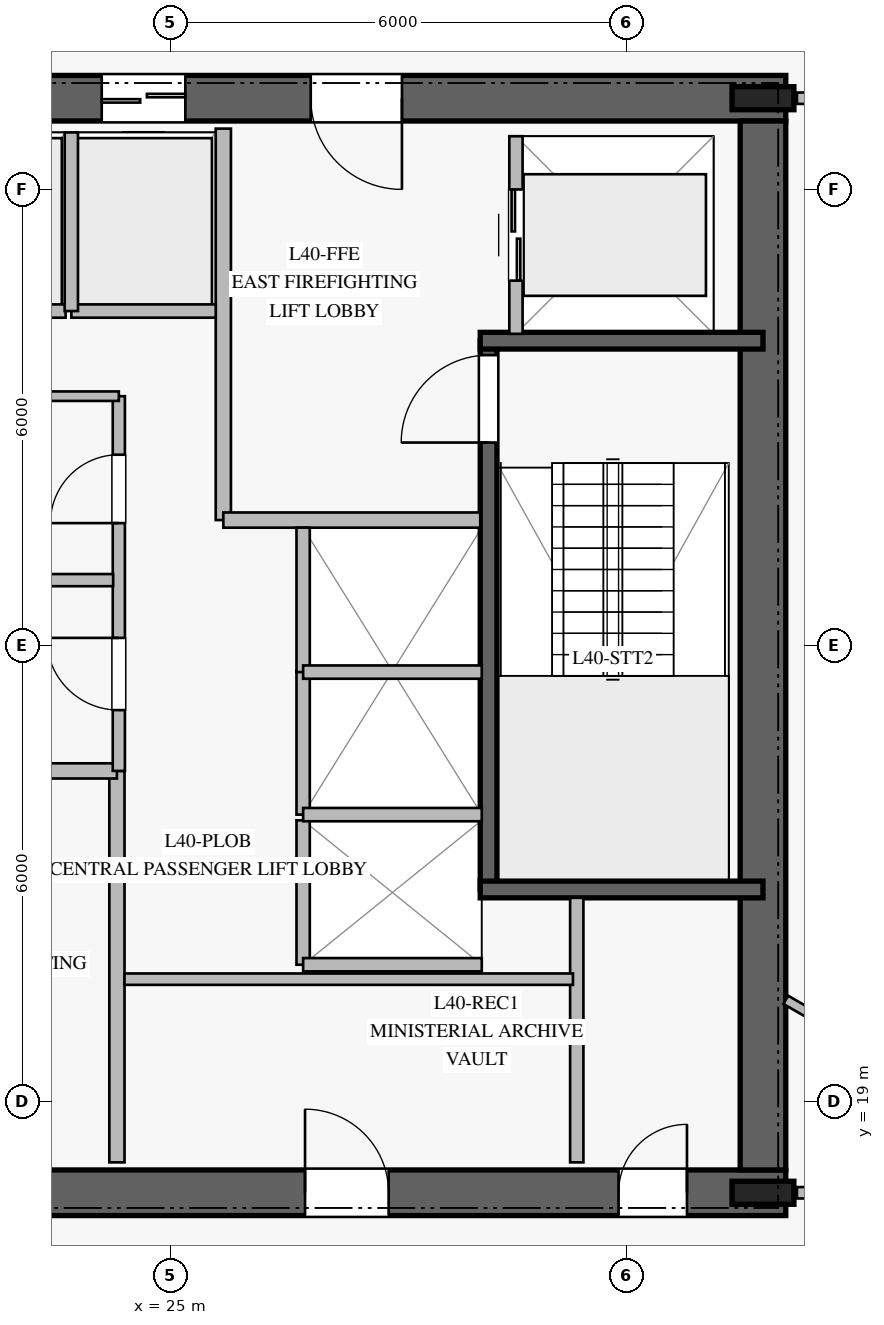
"""IFC4 building model, lengths in metres.
Left out: names, types, materials, properties, quantities, classifications, styles, units other than length and angle.
Written with IfcOpenShell. Run it as: python <this file> out.ifc"""

import sys

from ifc_helpers import new_model, si_unit, direction, frame, frame_2d, origin, origin_2d, place, context, subcontext, project, spatial, rectangle, i_section, extrude, element, fill, save


model = new_model("IFC4")
c1 = context("Model", 3, precision=1e-05, world=origin(), true_north=direction((0.0, 1.0)))
c2 = subcontext(c1, "Body", "Model", "MODEL_VIEW")
j1 = project(units=[si_unit("LENGTHUNIT", "METRE"), si_unit("PLANEANGLEUNIT", "RADIAN")], contexts=[c1])
p1 = place(None, origin())
s1 = spatial("IfcSite", under=j1, at=p1, CompositionType="ELEMENT")
p2 = place(p1, origin())
s2 = spatial("IfcBuilding", under=s1, at=p2, CompositionType="ELEMENT")
p3 = place(p2, frame((0.0, 0.0, 166.4)))
s3 = spatial("IfcBuildingStorey", under=s2, at=p3, CompositionType="ELEMENT", Elevation=166.4)
p4 = place(p3, frame((16.9, 17.8, 0.0), z_axis=(0.0, 0.0, 1.0), x_axis=(1.0, 0.0, 0.0)))
e1 = element("IfcWall", 1, at=p4, inside=s3, PredefinedType="SHEAR", context=c2, shape_type="SweptSolid", body=[
    extrude(rectangle(XDim=16.2, YDim=0.6, at=frame_2d((8.1, 0.0))), origin(), (0.0, 0.0, 1.0), 3.7),
])
p5 = place(p4, frame((5.05, 0.0, 0.0)))
e2 = element("IfcOpeningElement", 2, at=p5, cuts=e1, PredefinedType="OPENING", context=c2, shape_type="SweptSolid", body=[
    extrude(rectangle(XDim=1.2, YDim=2.25, at=frame_2d((0.6, 1.125))), frame((0.0, 0.31, 0.0), z_axis=(0.0, -1.0, 0.0), x_axis=(1.0, 0.0, 0.0)), (0.0, 0.0, 1.0), 0.62),
])
p6 = place(p4, frame((14.0, 0.0, 0.0)))
e3 = element("IfcOpeningElement", 3, at=p6, cuts=e1, PredefinedType="OPENING", context=c2, shape_type="SweptSolid", body=[
    extrude(rectangle(XDim=0.9, YDim=2.1, at=frame_2d((0.45, 1.05))), frame((0.0, 0.31, 0.0), z_axis=(0.0, -1.0, 0.0), x_axis=(1.0, 0.0, 0.0)), (0.0, 0.0, 1.0), 0.62),
])
p7 = place(p4, frame((9.875, 0.0, 0.0)))
e4 = element("IfcOpeningElement", 4, at=p7, cuts=e1, PredefinedType="OPENING", context=c2, shape_type="SweptSolid", body=[
    extrude(rectangle(XDim=1.1, YDim=2.2, at=frame_2d((0.55, 1.1))), frame((0.0, 0.31, 0.0), z_axis=(0.0, -1.0, 0.0), x_axis=(1.0, 0.0, 0.0)), (0.0, 0.0, 1.0), 0.62),
])
p8 = place(p3, frame((33.1, 32.2, 0.0), z_axis=(0.0, 0.0, 1.0), x_axis=(-1.0, 0.0, 0.0)))
e5 = element("IfcWall", 5, at=p8, inside=s3, PredefinedType="SHEAR", context=c2, shape_type="SweptSolid", body=[
    extrude(rectangle(XDim=16.2, YDim=0.6, at=frame_2d((8.1, 0.0))), origin(), (0.0, 0.0, 1.0), 3.7),
])
p9 = place(p8, frame((5.05, 0.0, 0.0)))
e6 = element("IfcOpeningElement", 6, at=p9, cuts=e5, PredefinedType="OPENING", context=c2, shape_type="SweptSolid", body=[
    extrude(rectangle(XDim=1.2, YDim=2.25, at=frame_2d((0.6, 1.125))), frame((0.0, 0.31, 0.0), z_axis=(0.0, -1.0, 0.0), x_axis=(1.0, 0.0, 0.0)), (0.0, 0.0, 1.0), 0.62),
])
p10 = place(p8, frame((11.85, 0.0, 0.0)))
e7 = element("IfcOpeningElement", 7, at=p10, cuts=e5, PredefinedType="OPENING", context=c2, shape_type="SweptSolid", body=[
    extrude(rectangle(XDim=1.1, YDim=2.2, at=frame_2d((0.55, 1.1))), frame((0.0, 0.31, 0.0), z_axis=(0.0, -1.0, 0.0), x_axis=(1.0, 0.0, 0.0)), (0.0, 0.0, 1.0), 0.62),
])
p11 = place(p8, frame((9.875, 0.0, 0.0)))
e8 = element("IfcOpeningElement", 8, at=p11, cuts=e5, PredefinedType="OPENING", context=c2, shape_type="SweptSolid", body=[
    extrude(rectangle(XDim=1.1, YDim=2.2, at=frame_2d((0.55, 1.1))), frame((0.0, 0.31, 0.0), z_axis=(0.0, -1.0, 0.0), x_axis=(1.0, 0.0, 0.0)), (0.0, 0.0, 1.0), 0.62),
])
p12 = place(p8, frame((7.9, 0.0, 0.0)))
e9 = element("IfcOpeningElement", 9, at=p12, cuts=e5, PredefinedType="OPENING", context=c2, shape_type="SweptSolid", body=[
    extrude(rectangle(XDim=1.1, YDim=2.2, at=frame_2d((0.55, 1.1))), frame((0.0, 0.31, 0.0), z_axis=(0.0, -1.0, 0.0), x_axis=(1.0, 0.0, 0.0)), (0.0, 0.0, 1.0), 0.62),
])
p13 = place(p3, frame((32.8, 18.1, 0.0), z_axis=(0.0, 0.0, 1.0), x_axis=(0.0, 1.0, 0.0)))
e10 = element("IfcWall", 10, at=p13, inside=s3, PredefinedType="SHEAR", context=c2, shape_type="SweptSolid", body=[
    extrude(rectangle(XDim=13.8, YDim=0.6, at=frame_2d((6.9, 0.0))), origin(), (0.0, 0.0, 1.0), 3.7),
])
for number, where, z_axis, x_axis in (
    (11, (32.8, 17.8, 0.0), (0.0, 0.0, 1.0), (1.0, 0.0, 0.0)),
    (12, (32.8, 32.2, 0.0), (0.0, 0.0, 1.0), (1.0, 0.0, 0.0)),
):
    element("IfcColumn", number, at=place(p3, frame(where, z_axis=z_axis, x_axis=x_axis)), inside=s3, PredefinedType="COLUMN", context=c2, shape_type="SweptSolid", body=[
        extrude(i_section(OverallWidth=0.303, OverallDepth=0.814, WebThickness=0.021, FlangeThickness=0.04, at=origin_2d()), origin(), (0.0, 0.0, 1.0), 4.0),
    ])
p14 = place(p3, frame((29.19, 21.79, 0.0), z_axis=(0.0, 0.0, 1.0), x_axis=(0.0, 1.0, 0.0)))
e13 = element("IfcWall", 13, at=p14, inside=s3, PredefinedType="SOLIDWALL", context=c2, shape_type="SweptSolid", body=[
    extrude(rectangle(XDim=7.22, YDim=0.22, at=frame_2d((3.61, 0.0))), origin(), (0.0, 0.0, 1.0), 3.7),
])
p15 = place(p14, frame((5.88, 0.0, 0.0)))
e14 = element("IfcOpeningElement", 14, at=p15, cuts=e13, PredefinedType="OPENING", context=c2, shape_type="SweptSolid", body=[
    extrude(rectangle(XDim=1.15, YDim=2.2, at=frame_2d((0.575, 1.1))), frame((0.0, 0.12, 0.0), z_axis=(0.0, -1.0, 0.0), x_axis=(1.0, 0.0, 0.0)), (0.0, 0.0, 1.0), 0.24),
])
for number, where, z_axis, x_axis in (
    (15, (29.08, 21.79, 0.0), (0.0, 0.0, 1.0), (1.0, 0.0, 0.0)),
    (16, (29.08, 29.01, 0.0), (0.0, 0.0, 1.0), (1.0, 0.0, 0.0)),
):
    element("IfcWall", number, at=place(p3, frame(where, z_axis=z_axis, x_axis=x_axis)), inside=s3, PredefinedType="SOLIDWALL", context=c2, shape_type="SweptSolid", body=[
        extrude(rectangle(XDim=3.72, YDim=0.22, at=frame_2d((1.86, 0.0))), origin(), (0.0, 0.0, 1.0), 3.7),
    ])
p16 = place(p3, frame((24.3, 18.2, 0.0), z_axis=(0.0, 0.0, 1.0), x_axis=(0.0, 1.0, 0.0)))
e17 = element("IfcWall", 17, at=p16, inside=s3, PredefinedType="PARTITIONING", context=c2, shape_type="SweptSolid", body=[
    extrude(rectangle(XDim=5.15, YDim=0.2, at=frame_2d((2.575, 0.0))), origin(), (0.0, 0.0, 1.0), 3.7),
])
p17 = place(p3, frame((20.92, 23.35, 0.0), z_axis=(0.0, 0.0, 1.0), x_axis=(1.0, 0.0, 0.0)))
e18 = element("IfcWall", 18, at=p17, inside=s3, PredefinedType="PARTITIONING", context=c2, shape_type="SweptSolid", body=[
    extrude(rectangle(XDim=3.38, YDim=0.2, at=frame_2d((1.69, 0.0))), origin(), (0.0, 0.0, 1.0), 3.7),
])
p18 = place(p3, frame((25.7, 26.65, 0.0), z_axis=(0.0, 0.0, 1.0), x_axis=(0.0, 1.0, 0.0)))
e19 = element("IfcWall", 19, at=p18, inside=s3, PredefinedType="PARTITIONING", context=c2, shape_type="SweptSolid", body=[
    extrude(rectangle(XDim=5.15, YDim=0.2, at=frame_2d((2.575, 0.0))), origin(), (0.0, 0.0, 1.0), 3.7),
])
p19 = place(p3, frame((25.7, 26.65, 0.0), z_axis=(0.0, 0.0, 1.0), x_axis=(1.0, 0.0, 0.0)))
e20 = element("IfcWall", 20, at=p19, inside=s3, PredefinedType="PARTITIONING", context=c2, shape_type="SweptSolid", body=[
    extrude(rectangle(XDim=3.38, YDim=0.2, at=frame_2d((1.69, 0.0))), origin(), (0.0, 0.0, 1.0), 3.7),
])
p20 = place(p3, frame((24.325, 23.35, 0.0), z_axis=(0.0, 0.0, 1.0), x_axis=(0.0, 1.0, 0.0)))
e21 = element("IfcWall", 21, at=p20, inside=s3, PredefinedType="PLUMBINGWALL", context=c2, shape_type="SweptSolid", body=[
    extrude(rectangle(XDim=4.93, YDim=0.16, at=frame_2d((2.465, 0.0))), origin(), (0.0, 0.0, 1.0), 3.7),
])
p21 = place(p20, frame((0.8, 0.0, 0.0)))
e22 = element("IfcOpeningElement", 22, at=p21, cuts=e21, PredefinedType="OPENING", context=c2, shape_type="SweptSolid", body=[
    extrude(rectangle(XDim=0.95, YDim=2.1, at=frame_2d((0.475, 1.05))), frame((0.0, 0.09, 0.0), z_axis=(0.0, -1.0, 0.0), x_axis=(1.0, 0.0, 0.0)), (0.0, 0.0, 1.0), 0.18),
])
p22 = place(p20, frame((3.26, 0.0, 0.0)))
e23 = element("IfcOpeningElement", 23, at=p22, cuts=e21, PredefinedType="OPENING", context=c2, shape_type="SweptSolid", body=[
    extrude(rectangle(XDim=0.9, YDim=2.1, at=frame_2d((0.45, 1.05))), frame((0.0, 0.09, 0.0), z_axis=(0.0, -1.0, 0.0), x_axis=(1.0, 0.0, 0.0)), (0.0, 0.0, 1.0), 0.18),
])
p23 = place(p3, frame((20.92, 28.28, 0.0), z_axis=(0.0, 0.0, 1.0), x_axis=(1.0, 0.0, 0.0)))
e24 = element("IfcWall", 24, at=p23, inside=s3, PredefinedType="PARTITIONING", context=c2, shape_type="SweptSolid", body=[
    extrude(rectangle(XDim=3.405, YDim=0.125, at=frame_2d((1.703, 0.0))), origin(), (0.0, 0.0, 1.0), 3.7),
])
p24 = place(p3, frame((20.95, 25.86, 0.0), z_axis=(0.0, 0.0, 1.0), x_axis=(1.0, 0.0, 0.0)))
e25 = element("IfcWall", 25, at=p24, inside=s3, PredefinedType="PLUMBINGWALL", context=c2, shape_type="SweptSolid", body=[
    extrude(rectangle(XDim=3.3, YDim=0.16, at=frame_2d((1.65, 0.0))), origin(), (0.0, 0.0, 1.0), 3.7),
])
p25 = place(p3, frame((30.35, 18.2, 0.0), z_axis=(0.0, 0.0, 1.0), x_axis=(0.0, 1.0, 0.0)))
e26 = element("IfcWall", 26, at=p25, inside=s3, PredefinedType="PARTITIONING", context=c2, shape_type="SweptSolid", body=[
    extrude(rectangle(XDim=3.48, YDim=0.175, at=frame_2d((1.74, 0.0))), origin(), (0.0, 0.0, 1.0), 3.7),
])
p26 = place(p3, frame((24.4, 20.61, 0.0), z_axis=(0.0, 0.0, 1.0), x_axis=(1.0, 0.0, 0.0)))
e27 = element("IfcWall", 27, at=p26, inside=s3, PredefinedType="PARTITIONING", context=c2, shape_type="SweptSolid", body=[
    extrude(rectangle(XDim=5.9, YDim=0.15, at=frame_2d((2.95, 0.0))), origin(), (0.0, 0.0, 1.0), 3.7),
])
p27 = place(p3, frame((21.725, 29.4, 0.0), z_axis=(0.0, 0.0, 1.0), x_axis=(1.0, 0.0, 0.0)))
e28 = element("IfcWall", 28, at=p27, inside=s3, PredefinedType="PARTITIONING", context=c2, shape_type="SweptSolid", body=[
    extrude(rectangle(XDim=1.9, YDim=0.175, at=frame_2d((0.95, 0.0))), origin(), (0.0, 0.0, 1.0), 3.7),
])
p28 = place(p3, frame((23.7, 29.4, 0.0), z_axis=(0.0, 0.0, 1.0), x_axis=(1.0, 0.0, 0.0)))
e29 = element("IfcWall", 29, at=p28, inside=s3, PredefinedType="PARTITIONING", context=c2, shape_type="SweptSolid", body=[
    extrude(rectangle(XDim=1.9, YDim=0.175, at=frame_2d((0.95, 0.0))), origin(), (0.0, 0.0, 1.0), 3.7),
])
p29 = place(p3, frame((23.7, 29.4, 0.0), z_axis=(0.0, 0.0, 1.0), x_axis=(0.0, 1.0, 0.0)))
e30 = element("IfcWall", 30, at=p29, inside=s3, PredefinedType="PARTITIONING", context=c2, shape_type="SweptSolid", body=[
    extrude(rectangle(XDim=2.35, YDim=0.175, at=frame_2d((1.175, 0.0))), origin(), (0.0, 0.0, 1.0), 3.7),
])
p30 = place(p3, frame((26.75, 20.8, 0.0), z_axis=(0.0, 0.0, 1.0), x_axis=(0.0, 1.0, 0.0)))
e31 = element("IfcWall", 31, at=p30, inside=s3, PredefinedType="PARTITIONING", context=c2, shape_type="SweptSolid", body=[
    extrude(rectangle(XDim=1.9, YDim=0.175, at=frame_2d((0.95, 0.0))), origin(), (0.0, 0.0, 1.0), 3.7),
])
p31 = place(p3, frame((26.75, 20.8, 0.0), z_axis=(0.0, 0.0, 1.0), x_axis=(1.0, 0.0, 0.0)))
e32 = element("IfcWall", 32, at=p31, inside=s3, PredefinedType="PARTITIONING", context=c2, shape_type="SweptSolid", body=[
    extrude(rectangle(XDim=2.35, YDim=0.175, at=frame_2d((1.175, 0.0))), origin(), (0.0, 0.0, 1.0), 3.7),
])
p32 = place(p3, frame((26.75, 22.775, 0.0), z_axis=(0.0, 0.0, 1.0), x_axis=(0.0, 1.0, 0.0)))
e33 = element("IfcWall", 33, at=p32, inside=s3, PredefinedType="PARTITIONING", context=c2, shape_type="SweptSolid", body=[
    extrude(rectangle(XDim=1.9, YDim=0.175, at=frame_2d((0.95, 0.0))), origin(), (0.0, 0.0, 1.0), 3.7),
])
p33 = place(p3, frame((26.75, 22.775, 0.0), z_axis=(0.0, 0.0, 1.0), x_axis=(1.0, 0.0, 0.0)))
e34 = element("IfcWall", 34, at=p33, inside=s3, PredefinedType="PARTITIONING", context=c2, shape_type="SweptSolid", body=[
    extrude(rectangle(XDim=2.35, YDim=0.175, at=frame_2d((1.175, 0.0))), origin(), (0.0, 0.0, 1.0), 3.7),
])
p34 = place(p3, frame((26.75, 24.65, 0.0), z_axis=(0.0, 0.0, 1.0), x_axis=(0.0, 1.0, 0.0)))
e35 = element("IfcWall", 35, at=p34, inside=s3, PredefinedType="PARTITIONING", context=c2, shape_type="SweptSolid", body=[
    extrude(rectangle(XDim=1.9, YDim=0.175, at=frame_2d((0.95, 0.0))), origin(), (0.0, 0.0, 1.0), 3.7),
])
p35 = place(p3, frame((26.75, 24.65, 0.0), z_axis=(0.0, 0.0, 1.0), x_axis=(1.0, 0.0, 0.0)))
e36 = element("IfcWall", 36, at=p35, inside=s3, PredefinedType="PARTITIONING", context=c2, shape_type="SweptSolid", body=[
    extrude(rectangle(XDim=2.35, YDim=0.175, at=frame_2d((1.175, 0.0))), origin(), (0.0, 0.0, 1.0), 3.7),
])
p36 = place(p3, frame((29.55, 29.1, 0.0), z_axis=(0.0, 0.0, 1.0), x_axis=(0.0, 1.0, 0.0)))
e37 = element("IfcWall", 37, at=p36, inside=s3, PredefinedType="PARTITIONING", context=c2, shape_type="SweptSolid", body=[
    extrude(rectangle(XDim=2.6, YDim=0.175, at=frame_2d((1.3, 0.0))), origin(), (0.0, 0.0, 1.0), 3.7),
])
p37 = place(p36, frame((0.7, 0.0, 0.0)))
e38 = element("IfcOpeningElement", 38, at=p37, cuts=e37, PredefinedType="OPENING", context=c2, shape_type="SweptSolid", body=[
    extrude(rectangle(XDim=1.2, YDim=2.2, at=frame_2d((0.6, 1.1))), frame((0.0, 0.098, 0.0), z_axis=(0.0, -1.0, 0.0), x_axis=(1.0, 0.0, 0.0)), (0.0, 0.0, 1.0), 0.195),
])
for number, where, z_axis, x_axis in (
    (39, (41.2, 32.2, 0.0), (0.0, 0.0, 1.0), (-1.0, 0.0, 0.0)),
    (40, (33.247, 17.8, 0.0), (0.0, 0.0, 1.0), (1.0, 0.0, 0.0)),
):
    element("IfcWall", number, at=place(p3, frame(where, z_axis=z_axis, x_axis=x_axis)), inside=s3, PredefinedType="PARTITIONING", context=c2, shape_type="SweptSolid", body=[
        extrude(rectangle(XDim=7.953, YDim=0.15, at=frame_2d((3.977, 0.0))), origin(), (0.0, 0.0, 1.0), 3.15),
    ])
p38 = place(p3, frame((33.1, 20.338, 0.0), z_axis=(0.0, 0.0, 1.0), x_axis=(0.866676533117, -0.498870511199, 0.0)))
e41 = element("IfcWall", 41, at=p38, inside=s3, PredefinedType="PARTITIONING", context=c2, shape_type="SweptSolid", body=[
    extrude(rectangle(XDim=5.087, YDim=0.125, at=frame_2d((2.543, 0.0))), origin(), (0.0, 0.0, 1.0), 3.3),
])
p39 = place(p15, origin())
e42 = element("IfcDoor", 42, at=p39, inside=s3, OperationType="SINGLE_SWING_LEFT", PredefinedType="DOOR", context=c2, shape_type="SweptSolid", body=[
    extrude(rectangle(XDim=1.15, YDim=2.2, at=frame_2d((0.575, 1.1))), frame((0.0, 0.025, 0.0), z_axis=(0.0, -1.0, 0.0), x_axis=(1.0, 0.0, 0.0)), (0.0, 0.0, 1.0), 0.05),
])
fill(e14, e42)
p40 = place(p9, origin())
e43 = element("IfcDoor", 43, at=p40, inside=s3, OperationType="SINGLE_SWING_LEFT", PredefinedType="DOOR", context=c2, shape_type="SweptSolid", body=[
    extrude(rectangle(XDim=1.2, YDim=2.25, at=frame_2d((0.6, 1.125))), frame((0.0, 0.025, 0.0), z_axis=(0.0, -1.0, 0.0), x_axis=(1.0, 0.0, 0.0)), (0.0, 0.0, 1.0), 0.05),
])
fill(e6, e43)
p41 = place(p21, origin())
e44 = element("IfcDoor", 44, at=p41, inside=s3, OperationType="SINGLE_SWING_RIGHT", PredefinedType="DOOR", context=c2, shape_type="SweptSolid", body=[
    extrude(rectangle(XDim=0.95, YDim=2.1, at=frame_2d((0.475, 1.05))), frame((0.0, 0.025, 0.0), z_axis=(0.0, -1.0, 0.0), x_axis=(1.0, 0.0, 0.0)), (0.0, 0.0, 1.0), 0.05),
])
fill(e22, e44)
p42 = place(p22, origin())
e45 = element("IfcDoor", 45, at=p42, inside=s3, OperationType="SINGLE_SWING_LEFT", PredefinedType="DOOR", context=c2, shape_type="SweptSolid", body=[
    extrude(rectangle(XDim=0.9, YDim=2.1, at=frame_2d((0.45, 1.05))), frame((0.0, 0.025, 0.0), z_axis=(0.0, -1.0, 0.0), x_axis=(1.0, 0.0, 0.0)), (0.0, 0.0, 1.0), 0.05),
])
fill(e23, e45)
p43 = place(p6, origin())
e46 = element("IfcDoor", 46, at=p43, inside=s3, OperationType="SINGLE_SWING_RIGHT", PredefinedType="DOOR", context=c2, shape_type="SweptSolid", body=[
    extrude(rectangle(XDim=0.9, YDim=2.1, at=frame_2d((0.45, 1.05))), frame((0.0, 0.025, 0.0), z_axis=(0.0, -1.0, 0.0), x_axis=(1.0, 0.0, 0.0)), (0.0, 0.0, 1.0), 0.05),
])
fill(e3, e46)
p44 = place(p7, origin())
e47 = element("IfcDoor", 47, at=p44, inside=s3, OperationType="SINGLE_SWING_LEFT", PredefinedType="DOOR", context=c2, shape_type="SweptSolid", body=[
    extrude(rectangle(XDim=1.1, YDim=2.2, at=frame_2d((0.55, 1.1))), frame((0.0, 0.025, 0.0), z_axis=(0.0, -1.0, 0.0), x_axis=(1.0, 0.0, 0.0)), (0.0, 0.0, 1.0), 0.05),
])
fill(e4, e47)
p45 = place(p12, origin())
e48 = element("IfcDoor", 48, at=p45, inside=s3, OperationType="DOUBLE_DOOR_SLIDING", PredefinedType="DOOR", context=c2, shape_type="SweptSolid", body=[
    extrude(rectangle(XDim=1.1, YDim=2.2, at=frame_2d((0.55, 1.1))), frame((0.0, 0.025, 0.0), z_axis=(0.0, -1.0, 0.0), x_axis=(1.0, 0.0, 0.0)), (0.0, 0.0, 1.0), 0.05),
])
fill(e9, e48)
p46 = place(p37, origin())
e49 = element("IfcDoor", 49, at=p46, inside=s3, OperationType="DOUBLE_DOOR_SLIDING", PredefinedType="DOOR", context=c2, shape_type="SweptSolid", body=[
    extrude(rectangle(XDim=1.2, YDim=2.2, at=frame_2d((0.6, 1.1))), frame((0.0, 0.025, 0.0), z_axis=(0.0, -1.0, 0.0), x_axis=(1.0, 0.0, 0.0)), (0.0, 0.0, 1.0), 0.05),
])
fill(e38, e49)
save(model, sys.argv[1])
